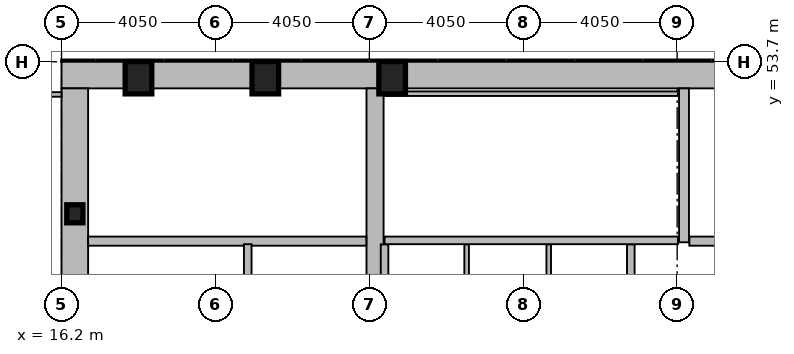
"""IFC4 building model, lengths in metres.
Left out: names, types, materials, properties, quantities, classifications, styles, units other than length and angle.
Written with IfcOpenShell. Run it as: python <this file> out.ifc"""

import sys

from ifc_helpers import new_model, si_unit, direction, frame, frame_2d, origin, origin_2d, place, context, subcontext, project, spatial, rectangle, hollow_rectangle, i_section, extrude, element, fill, save


model = new_model("IFC4")
c1 = context("Model", 3, precision=1e-05, world=origin(), true_north=direction((0.0, 1.0)))
c2 = subcontext(c1, "Body", "Model", "MODEL_VIEW")
j1 = project(units=[si_unit("LENGTHUNIT", "METRE"), si_unit("PLANEANGLEUNIT", "RADIAN")], contexts=[c1])
p1 = place(None, origin())
s1 = spatial("IfcSite", under=j1, at=p1, CompositionType="ELEMENT")
p2 = place(p1, origin())
s2 = spatial("IfcBuilding", under=s1, at=p2, CompositionType="ELEMENT")
p3 = place(p2, frame((0.0, 0.0, 106.6)))
s3 = spatial("IfcBuildingStorey", under=s2, at=p3, CompositionType="ELEMENT", Elevation=106.6)
p4 = place(p3, frame((16.2, 53.35, 0.0), z_axis=(0.0, 0.0, 1.0), x_axis=(1.0, 0.0, 0.0)))
e1 = element("IfcWall", 1, at=p4, inside=s3, PredefinedType="SHEAR", context=c2, shape_type="SweptSolid", body=[
    extrude(rectangle(XDim=40.5, YDim=0.7, at=frame_2d((20.25, 0.0))), origin(), (0.0, 0.0, 1.0), 4.24),
])
p5 = place(p3, frame((16.55, 42.0, 0.0), z_axis=(0.0, 0.0, 1.0), x_axis=(0.0, 1.0, 0.0)))
e2 = element("IfcWall", 2, at=p5, inside=s3, PredefinedType="SHEAR", context=c2, shape_type="SweptSolid", body=[
    extrude(rectangle(XDim=11.0, YDim=0.7, at=frame_2d((5.5, 0.0))), origin(), (0.0, 0.0, 1.0), 4.24),
])
p6 = place(p3, frame((24.45, 42.0, 0.0), z_axis=(0.0, 0.0, 1.0), x_axis=(0.0, 1.0, 0.0)))
e3 = element("IfcWall", 3, at=p6, inside=s3, PredefinedType="SHEAR", context=c2, shape_type="SweptSolid", body=[
    extrude(rectangle(XDim=11.0, YDim=0.45, at=frame_2d((5.5, 0.0))), origin(), (0.0, 0.0, 1.0), 4.24),
])
p7 = place(p3, frame((32.58, 48.95, 0.0), z_axis=(0.0, 0.0, 1.0), x_axis=(0.0, 1.0, 0.0)))
e4 = element("IfcWall", 4, at=p7, inside=s3, PredefinedType="SHEAR", context=c2, shape_type="SweptSolid", body=[
    extrude(rectangle(XDim=4.05, YDim=0.26, at=frame_2d((2.025, 0.0))), origin(), (0.0, 0.0, 1.0), 4.24),
])
p8 = place(p3, frame((16.9, 48.98, 0.0), z_axis=(0.0, 0.0, 1.0), x_axis=(1.0, 0.0, 0.0)))
e5 = element("IfcWall", 5, at=p8, inside=s3, PredefinedType="SHEAR", context=c2, shape_type="SweptSolid", body=[
    extrude(rectangle(XDim=7.32, YDim=0.24, at=frame_2d((3.66, 0.0))), origin(), (0.0, 0.0, 1.0), 4.24),
])
p9 = place(p8, frame((0.22, 0.0, 0.0)))
e6 = element("IfcOpeningElement", 6, at=p9, cuts=e5, PredefinedType="OPENING", context=c2, shape_type="SweptSolid", body=[
    extrude(rectangle(XDim=1.05, YDim=2.15, at=frame_2d((0.525, 1.075))), frame((0.0, 0.13, 0.0), z_axis=(0.0, -1.0, 0.0), x_axis=(1.0, 0.0, 0.0)), (0.0, 0.0, 1.0), 0.26),
])
p10 = place(p3, frame((32.72, 48.98, 0.0), z_axis=(0.0, 0.0, 1.0), x_axis=(1.0, 0.0, 0.0)))
e7 = element("IfcWall", 7, at=p10, inside=s3, PredefinedType="SHEAR", context=c2, shape_type="SweptSolid", body=[
    extrude(rectangle(XDim=7.56, YDim=0.24, at=frame_2d((3.78, 0.0))), origin(), (0.0, 0.0, 1.0), 4.24),
])
p11 = place(p10, frame((0.22, 0.0, 0.0)))
e8 = element("IfcOpeningElement", 8, at=p11, cuts=e7, PredefinedType="OPENING", context=c2, shape_type="SweptSolid", body=[
    extrude(rectangle(XDim=1.05, YDim=2.15, at=frame_2d((0.525, 1.075))), frame((0.0, 0.13, 0.0), z_axis=(0.0, -1.0, 0.0), x_axis=(1.0, 0.0, 0.0)), (0.0, 0.0, 1.0), 0.26),
])
for number, where, z_axis, x_axis in (
    (9, (18.225, 53.28, 0.0), (0.0, 0.0, 1.0), (1.0, 0.0, 0.0)),
    (10, (21.562, 53.28, 0.0), (0.0, 0.0, 1.0), (1.0, 0.0, 0.0)),
    (11, (24.9, 53.28, 0.0), (0.0, 0.0, 1.0), (1.0, 0.0, 0.0)),
):
    element("IfcColumn", number, at=place(p3, frame(where, z_axis=z_axis, x_axis=x_axis)), inside=s3, PredefinedType="COLUMN", context=c2, shape_type="SweptSolid", body=[
        extrude(hollow_rectangle(XDim=0.7, YDim=0.85, WallThickness=0.05, at=origin_2d()), origin(), (0.0, 0.0, 1.0), 4.4),
    ])
p12 = place(p3, frame((16.55, 49.7, 0.0), z_axis=(0.0, 0.0, 1.0), x_axis=(1.0, 0.0, 0.0)))
e12 = element("IfcColumn", 12, at=p12, inside=s3, PredefinedType="COLUMN", context=c2, shape_type="SweptSolid", body=[
    extrude(i_section(OverallWidth=0.424, OverallDepth=0.474, WebThickness=0.048, FlangeThickness=0.077, at=origin_2d()), origin(), (0.0, 0.0, 1.0), 4.4),
])
p13 = place(p3, frame((21.1, 44.6, 0.0), z_axis=(0.0, 0.0, 1.0), x_axis=(0.0, 1.0, 0.0)))
e13 = element("IfcWall", 13, at=p13, inside=s3, PredefinedType="PARTITIONING", context=c2, shape_type="SweptSolid", body=[
    extrude(rectangle(XDim=4.3, YDim=0.2, at=frame_2d((2.15, 0.0))), origin(), (0.0, 0.0, 1.0), 4.24),
])
for number, where, z_axis, x_axis in (
    (14, (24.7, 46.8, 0.0), (0.0, 0.0, 1.0), (0.0, 1.0, 0.0)),
    (15, (31.18, 46.8, 0.0), (0.0, 0.0, 1.0), (0.0, 1.0, 0.0)),
):
    element("IfcWall", number, at=place(p3, frame(where, z_axis=z_axis, x_axis=x_axis)), inside=s3, PredefinedType="PARTITIONING", context=c2, shape_type="SweptSolid", body=[
        extrude(rectangle(XDim=2.095, YDim=0.2, at=frame_2d((1.047, 0.0))), origin(), (0.0, 0.0, 1.0), 4.24),
    ])
for number, where, z_axis, x_axis in (
    (16, (26.86, 46.8, 0.0), (0.0, 0.0, 1.0), (0.0, 1.0, 0.0)),
    (17, (29.02, 46.8, 0.0), (0.0, 0.0, 1.0), (0.0, 1.0, 0.0)),
):
    element("IfcWall", number, at=place(p3, frame(where, z_axis=z_axis, x_axis=x_axis)), inside=s3, PredefinedType="PARTITIONING", context=c2, shape_type="SweptSolid", body=[
        extrude(rectangle(XDim=2.095, YDim=0.12, at=frame_2d((1.047, 0.0))), origin(), (0.0, 0.0, 1.0), 4.24),
    ])
p14 = place(p3, frame((24.7, 52.86, 0.0), z_axis=(0.0, 0.0, 1.0), x_axis=(1.0, 0.0, 0.0)))
e18 = element("IfcWall", 18, at=p14, inside=s3, PredefinedType="PARTITIONING", context=c2, shape_type="SweptSolid", body=[
    extrude(rectangle(XDim=7.72, YDim=0.12, at=frame_2d((3.86, 0.0))), origin(), (0.0, 0.0, 1.0), 4.24),
])
p15 = place(p3, frame((24.7, 49.0, 0.0), z_axis=(0.0, 0.0, 1.0), x_axis=(1.0, 0.0, 0.0)))
e19 = element("IfcWall", 19, at=p15, inside=s3, PredefinedType="PARTITIONING", context=c2, shape_type="SweptSolid", body=[
    extrude(rectangle(XDim=7.72, YDim=0.2, at=frame_2d((3.86, 0.0))), origin(), (0.0, 0.0, 1.0), 4.24),
])
p16 = place(p15, frame((6.56, 0.0, 0.0)))
e20 = element("IfcOpeningElement", 20, at=p16, cuts=e19, PredefinedType="OPENING", context=c2, shape_type="SweptSolid", body=[
    extrude(rectangle(XDim=0.95, YDim=2.1, at=frame_2d((0.475, 1.05))), frame((0.0, 0.11, 0.0), z_axis=(0.0, -1.0, 0.0), x_axis=(1.0, 0.0, 0.0)), (0.0, 0.0, 1.0), 0.22),
])
p17 = place(p3, frame((4.095, 52.84, 0.0), z_axis=(0.0, 0.0, 1.0), x_axis=(1.0, 0.0, 0.0)))
e21 = element("IfcWall", 21, at=p17, inside=s3, PredefinedType="PARTITIONING", context=c2, shape_type="SweptSolid", body=[
    extrude(rectangle(XDim=12.105, YDim=0.12, at=frame_2d((6.052, 0.0))), origin(), (0.0, 0.0, 1.0), 4.24),
])
p18 = place(p9, origin())
e22 = element("IfcDoor", 22, at=p18, inside=s3, OperationType="SINGLE_SWING_LEFT", PredefinedType="DOOR", context=c2, shape_type="SweptSolid", body=[
    extrude(rectangle(XDim=1.05, YDim=2.15, at=frame_2d((0.525, 1.075))), frame((0.0, 0.025, 0.0), z_axis=(0.0, -1.0, 0.0), x_axis=(1.0, 0.0, 0.0)), (0.0, 0.0, 1.0), 0.05),
])
fill(e6, e22)
p19 = place(p11, origin())
e23 = element("IfcDoor", 23, at=p19, inside=s3, OperationType="SINGLE_SWING_LEFT", PredefinedType="DOOR", context=c2, shape_type="SweptSolid", body=[
    extrude(rectangle(XDim=1.05, YDim=2.15, at=frame_2d((0.525, 1.075))), frame((0.0, 0.025, 0.0), z_axis=(0.0, -1.0, 0.0), x_axis=(1.0, 0.0, 0.0)), (0.0, 0.0, 1.0), 0.05),
])
fill(e8, e23)
p20 = place(p16, origin())
e24 = element("IfcDoor", 24, at=p20, inside=s3, OperationType="SINGLE_SWING_RIGHT", PredefinedType="DOOR", context=c2, shape_type="SweptSolid", body=[
    extrude(rectangle(XDim=0.95, YDim=2.1, at=frame_2d((0.475, 1.05))), frame((0.0, 0.025, 0.0), z_axis=(0.0, -1.0, 0.0), x_axis=(1.0, 0.0, 0.0)), (0.0, 0.0, 1.0), 0.05),
])
fill(e20, e24)
save(model, sys.argv[1])
